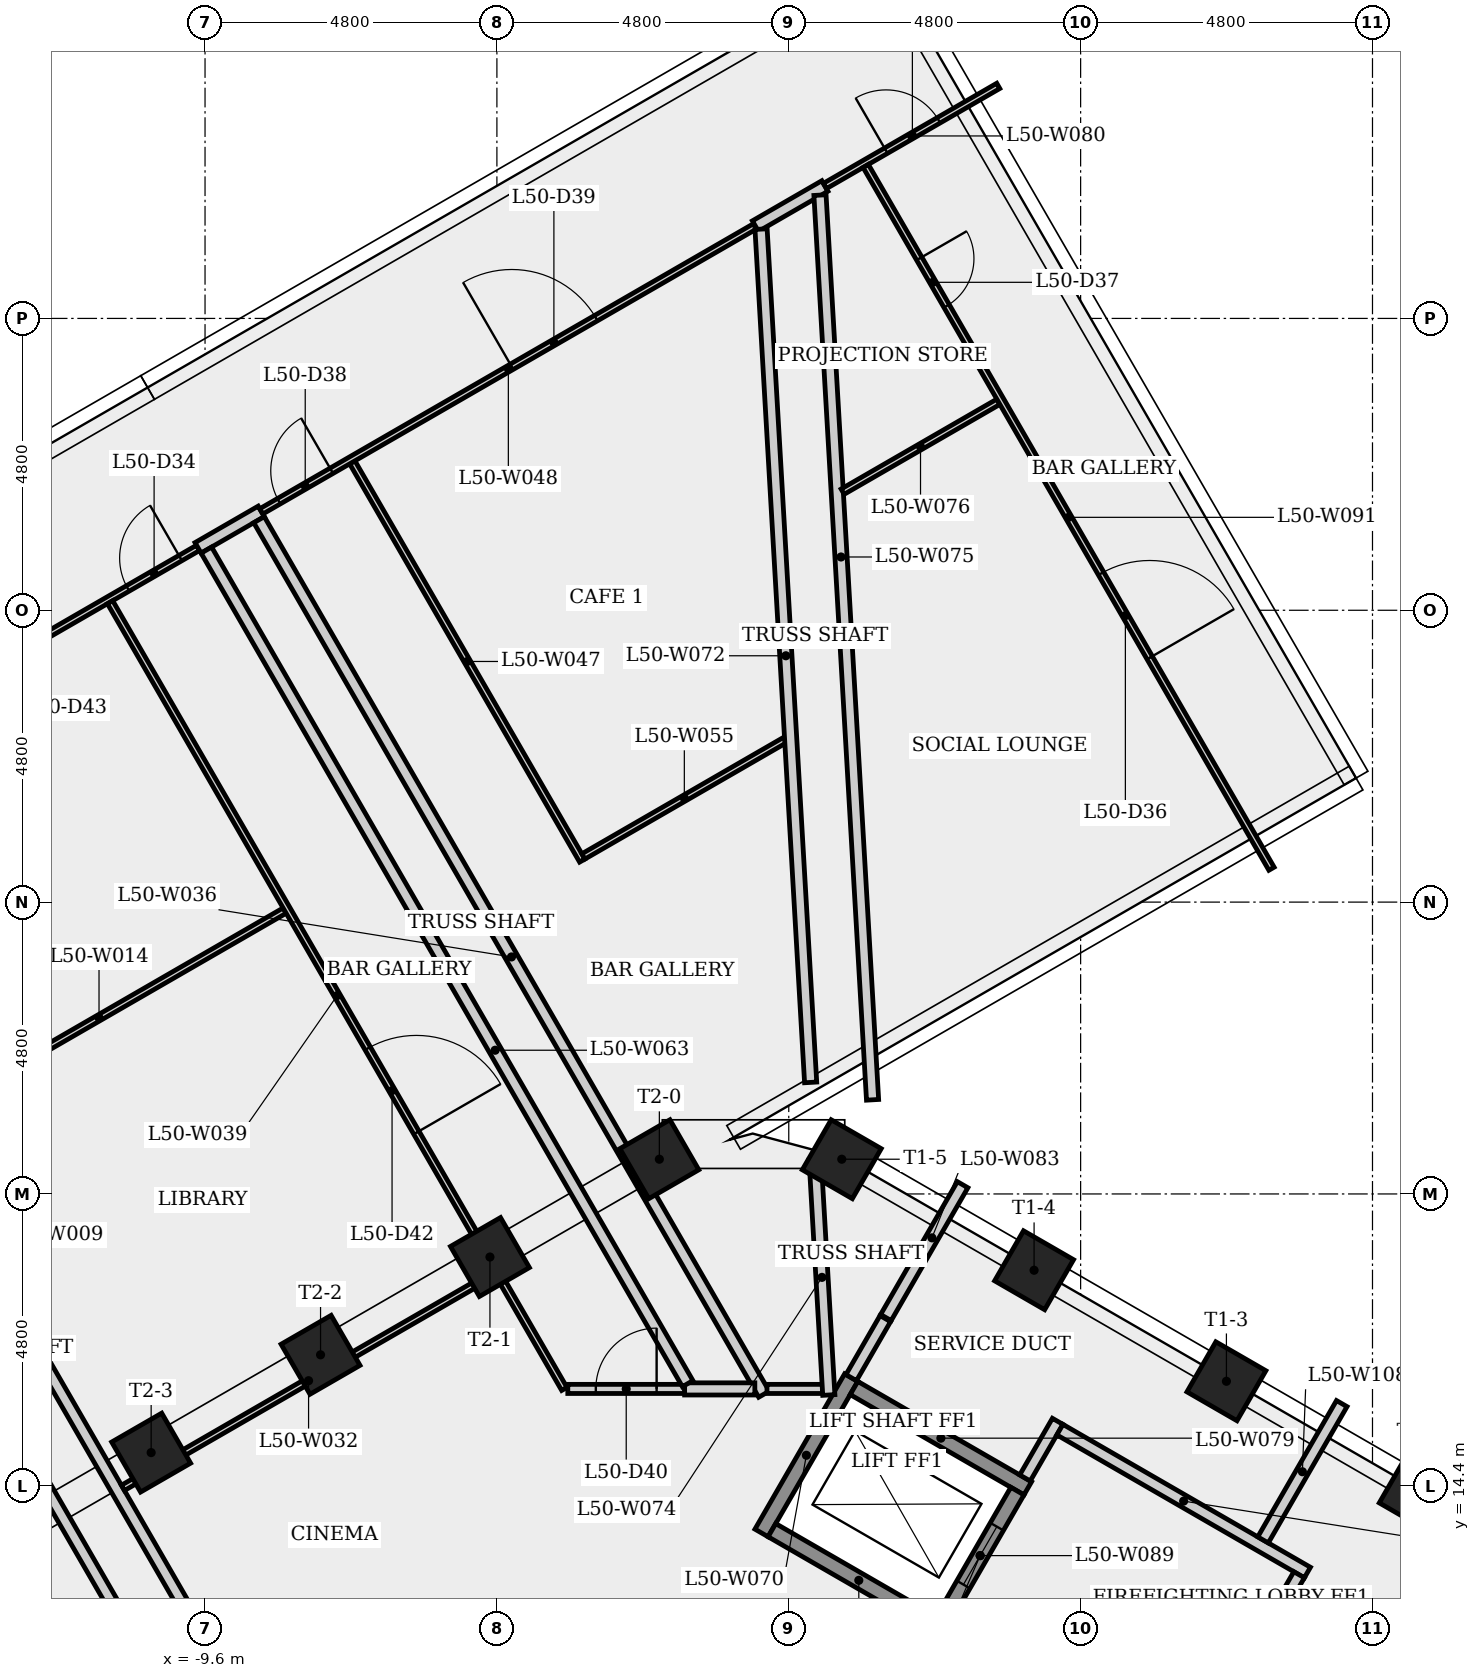
"""IFC4 building model, lengths in metres.
Left out: names, types, materials, properties, quantities, classifications, styles, units other than length and angle.
Written with IfcOpenShell. Run it as: python <this file> out.ifc"""

import sys

from ifc_helpers import new_model, si_unit, direction, frame, frame_2d, origin, origin_2d, place, context, subcontext, project, spatial, rectangle, extrude, element, fill, save


model = new_model("IFC4")
c1 = context("Model", 3, precision=1e-05, world=origin(), true_north=direction((0.0, 1.0)))
c2 = subcontext(c1, "Body", "Model", "MODEL_VIEW")
j1 = project(units=[si_unit("LENGTHUNIT", "METRE"), si_unit("PLANEANGLEUNIT", "RADIAN")], contexts=[c1])
p1 = place(None, origin())
s1 = spatial("IfcSite", under=j1, at=p1, CompositionType="ELEMENT")
p2 = place(p1, origin())
s2 = spatial("IfcBuilding", under=s1, at=p2, CompositionType="ELEMENT")
p3 = place(p2, frame((0.0, 0.0, 186.7)))
s3 = spatial("IfcBuildingStorey", under=s2, at=p3, CompositionType="ELEMENT", Elevation=186.7)
for number, where, z_axis, x_axis in (
    (1, (10.361, 14.293, 0.0), (0.0, 0.0, 1.0), (0.5, 0.866, 0.0)),
    (2, (7.198, 16.119, 0.0), (0.0, 0.0, 1.0), (0.5, 0.866, 0.0)),
    (3, (4.035, 17.945, 0.0), (0.0, 0.0, 1.0), (0.5, 0.866, 0.0)),
    (4, (0.872, 19.771, 0.0), (0.0, 0.0, 1.0), (0.5, 0.866, 0.0)),
    (5, (-2.128, 19.771, 0.0), (0.0, 0.0, 1.0), (-0.5, 0.866, 0.0)),
    (6, (-4.914, 18.163, 0.0), (0.0, 0.0, 1.0), (-0.5, 0.866, 0.0)),
    (7, (-7.7, 16.554, 0.0), (0.0, 0.0, 1.0), (-0.5, 0.866, 0.0)),
    (8, (-10.486, 14.946, 0.0), (0.0, 0.0, 1.0), (-0.5, 0.866, 0.0)),
):
    element("IfcColumn", number, at=place(p3, frame(where, z_axis=z_axis, x_axis=x_axis)), inside=s3, PredefinedType="COLUMN", context=c2, shape_type="SweptSolid", body=[
        extrude(rectangle(XDim=0.95, YDim=0.95, at=origin_2d()), origin(), (0.0, 0.0, 1.0), 4.0),
    ])
p4 = place(p3, frame((-17.372, 25.29, 0.0), z_axis=(0.0, 0.0, 1.0), x_axis=(0.5000029704, -0.866023688816, 0.0)))
e9 = element("IfcWall", 9, at=p4, inside=s3, PredefinedType="PLUMBINGWALL", context=c2, shape_type="SweptSolid", body=[
    extrude(rectangle(XDim=19.538, YDim=0.2, at=frame_2d((9.769, 0.0))), origin(), (0.0, 0.0, 1.0), 3.6),
])
p5 = place(p3, frame((-18.238, 24.79, 0.0), z_axis=(0.0, 0.0, 1.0), x_axis=(0.500002415695, -0.866024009078, 0.0)))
e10 = element("IfcWall", 10, at=p5, inside=s3, PredefinedType="PLUMBINGWALL", context=c2, shape_type="SweptSolid", body=[
    extrude(rectangle(XDim=15.123, YDim=0.2, at=frame_2d((7.561, 0.0))), origin(), (0.0, 0.0, 1.0), 3.6),
])
p6 = place(p3, frame((-14.396, 20.335, 0.0), z_axis=(0.0, 0.0, 1.0), x_axis=(0.866031034943, 0.499990246421, 0.0)))
e11 = element("IfcWall", 11, at=p6, inside=s3, PredefinedType="PARTITIONING", context=c2, shape_type="SweptSolid", body=[
    extrude(rectangle(XDim=7.05, YDim=0.1, at=frame_2d((3.525, 0.0))), origin(), (0.0, 0.0, 1.0), 3.6),
])
p7 = place(p3, frame((-17.336, 25.426, 0.0), z_axis=(0.0, 0.0, 1.0), x_axis=(0.866020190133, 0.500009030201, 0.0)))
e12 = element("IfcWall", 12, at=p7, inside=s3, PredefinedType="PARTITIONING", context=c2, shape_type="SweptSolid", body=[
    extrude(rectangle(XDim=8.8, YDim=0.1, at=frame_2d((4.4, 0.0))), origin(), (0.0, 0.0, 1.0), 3.6),
])
p8 = place(p7, frame((7.465, 0.0, 0.0)))
e13 = element("IfcOpeningElement", 13, at=p8, cuts=e12, PredefinedType="OPENING", context=c2, shape_type="SweptSolid", body=[
    extrude(rectangle(XDim=1.0, YDim=2.1, at=frame_2d((0.5, 1.05))), frame((0.0, 0.06, 0.0), z_axis=(0.0, -1.0, 0.0), x_axis=(1.0, 0.0, 0.0)), (0.0, 0.0, 1.0), 0.12),
])
p9 = place(p7, frame((2.735, 0.0, 0.0)))
e14 = element("IfcOpeningElement", 14, at=p9, cuts=e12, PredefinedType="OPENING", context=c2, shape_type="SweptSolid", body=[
    extrude(rectangle(XDim=1.6, YDim=2.1, at=frame_2d((0.8, 1.05))), frame((0.0, 0.06, 0.0), z_axis=(0.0, -1.0, 0.0), x_axis=(1.0, 0.0, 0.0)), (0.0, 0.0, 1.0), 0.12),
])
p10 = place(p3, frame((-10.95, 14.366, 0.0), z_axis=(0.0, 0.0, 1.0), x_axis=(0.866016039709, 0.500016218704, 0.0)))
e15 = element("IfcWall", 15, at=p10, inside=s3, PredefinedType="PARTITIONING", context=c2, shape_type="SweptSolid", body=[
    extrude(rectangle(XDim=7.05, YDim=0.1, at=frame_2d((3.525, 0.0))), origin(), (0.0, 0.0, 1.0), 3.6),
])
p11 = place(p3, frame((-9.715, 29.826, 0.0), z_axis=(0.0, 0.0, 1.0), x_axis=(0.866094119867, 0.499880961361, 0.0)))
e16 = element("IfcWall", 16, at=p11, inside=s3, PredefinedType="PLUMBINGWALL", context=c2, shape_type="SweptSolid", body=[
    extrude(rectangle(XDim=1.2, YDim=0.2, at=frame_2d((0.6, 0.0))), origin(), (0.0, 0.0, 1.0), 3.6),
])
p12 = place(p3, frame((-8.712, 30.29, 0.0), z_axis=(0.0, 0.0, 1.0), x_axis=(0.500001553912, -0.866024506631, 0.0)))
e17 = element("IfcWall", 17, at=p12, inside=s3, PredefinedType="PLUMBINGWALL", context=c2, shape_type="SweptSolid", body=[
    extrude(rectangle(XDim=16.608, YDim=0.2, at=frame_2d((8.304, 0.0))), origin(), (0.0, 0.0, 1.0), 3.6),
])
p13 = place(p3, frame((-11.162, 28.933, 0.0), z_axis=(0.0, 0.0, 1.0), x_axis=(0.500005339912, -0.866022320763, 0.0)))
e18 = element("IfcWall", 18, at=p13, inside=s3, PredefinedType="PARTITIONING", context=c2, shape_type="SweptSolid", body=[
    extrude(rectangle(XDim=14.941, YDim=0.1, at=frame_2d((7.471, 0.0))), origin(), (0.0, 0.0, 1.0), 3.6),
])
p14 = place(p13, frame((8.475, 0.0, 0.0)))
e19 = element("IfcOpeningElement", 19, at=p14, cuts=e18, PredefinedType="OPENING", context=c2, shape_type="SweptSolid", body=[
    extrude(rectangle(XDim=1.6, YDim=2.1, at=frame_2d((0.8, 1.05))), frame((0.0, 0.06, 0.0), z_axis=(0.0, -1.0, 0.0), x_axis=(1.0, 0.0, 0.0)), (0.0, 0.0, 1.0), 0.12),
])
p15 = place(p3, frame((-7.178, 31.233, 0.0), z_axis=(0.0, 0.0, 1.0), x_axis=(0.500006527538, -0.866021635076, 0.0)))
e20 = element("IfcWall", 20, at=p15, inside=s3, PredefinedType="PARTITIONING", context=c2, shape_type="SweptSolid", body=[
    extrude(rectangle(XDim=7.563, YDim=0.1, at=frame_2d((3.782, 0.0))), origin(), (0.0, 0.0, 1.0), 3.6),
])
p16 = place(p3, frame((-8.676, 30.426, 0.0), z_axis=(0.0, 0.0, 1.0), x_axis=(0.866025296335, 0.500000186108, 0.0)))
e21 = element("IfcWall", 21, at=p16, inside=s3, PredefinedType="PARTITIONING", context=c2, shape_type="SweptSolid", body=[
    extrude(rectangle(XDim=9.385, YDim=0.1, at=frame_2d((4.692, 0.0))), origin(), (0.0, 0.0, 1.0), 3.6),
])
p17 = place(p16, frame((0.335, 0.0, 0.0)))
e22 = element("IfcOpeningElement", 22, at=p17, cuts=e21, PredefinedType="OPENING", context=c2, shape_type="SweptSolid", body=[
    extrude(rectangle(XDim=1.0, YDim=2.1, at=frame_2d((0.5, 1.05))), frame((0.0, 0.06, 0.0), z_axis=(0.0, -1.0, 0.0), x_axis=(1.0, 0.0, 0.0)), (0.0, 0.0, 1.0), 0.12),
])
p18 = place(p16, frame((4.757, 0.0, 0.0)))
e23 = element("IfcOpeningElement", 23, at=p18, cuts=e21, PredefinedType="OPENING", context=c2, shape_type="SweptSolid", body=[
    extrude(rectangle(XDim=1.6, YDim=2.1, at=frame_2d((0.8, 1.05))), frame((0.0, 0.06, 0.0), z_axis=(0.0, -1.0, 0.0), x_axis=(1.0, 0.0, 0.0)), (0.0, 0.0, 1.0), 0.12),
])
p19 = place(p3, frame((-3.634, 15.993, 0.0), z_axis=(0.0, 0.0, 1.0), x_axis=(1.0, 0.0, 0.0)))
e24 = element("IfcWall", 24, at=p19, inside=s3, PredefinedType="PARTITIONING", context=c2, shape_type="SweptSolid", body=[
    extrude(rectangle(XDim=1.921, YDim=0.15, at=frame_2d((0.96, 0.0))), origin(), (0.0, 0.0, 1.0), 3.6),
])
p20 = place(p19, frame((0.461, 0.0, 0.0)))
e25 = element("IfcOpeningElement", 25, at=p20, cuts=e24, PredefinedType="OPENING", context=c2, shape_type="SweptSolid", body=[
    extrude(rectangle(XDim=1.0, YDim=2.1, at=frame_2d((0.5, 1.05))), frame((0.0, 0.085, 0.0), z_axis=(0.0, -1.0, 0.0), x_axis=(1.0, 0.0, 0.0)), (0.0, 0.0, 1.0), 0.17),
])
p21 = place(p3, frame((-3.378, 24.751, 0.0), z_axis=(0.0, 0.0, 1.0), x_axis=(0.866060495566, 0.499939214325, 0.0)))
e26 = element("IfcWall", 26, at=p21, inside=s3, PredefinedType="PARTITIONING", context=c2, shape_type="SweptSolid", body=[
    extrude(rectangle(XDim=3.835, YDim=0.1, at=frame_2d((1.917, 0.0))), origin(), (0.0, 0.0, 1.0), 3.6),
])
p22 = place(p3, frame((-1.713, 15.993, 0.0), z_axis=(0.0, 0.0, 1.0), x_axis=(1.0, 0.0, 0.0)))
e27 = element("IfcWall", 27, at=p22, inside=s3, PredefinedType="PLUMBINGWALL", context=c2, shape_type="SweptSolid", body=[
    extrude(rectangle(XDim=1.155, YDim=0.2, at=frame_2d((0.578, 0.0))), origin(), (0.0, 0.0, 1.0), 3.6),
])
p23 = place(p3, frame((-1.663, 16.08, 0.0), z_axis=(0.0, 0.0, 1.0), x_axis=(-0.499998792841, 0.866026100737, 0.0)))
e28 = element("IfcWall", 28, at=p23, inside=s3, PredefinedType="PLUMBINGWALL", context=c2, shape_type="SweptSolid", body=[
    extrude(rectangle(XDim=15.831, YDim=0.2, at=frame_2d((7.915, 0.0))), origin(), (0.0, 0.0, 1.0), 3.6),
])
p24 = place(p3, frame((-0.548, 35.118, 0.0), z_axis=(0.0, 0.0, 1.0), x_axis=(0.865979071295, 0.500080241641, 0.0)))
e29 = element("IfcWall", 29, at=p24, inside=s3, PredefinedType="PLUMBINGWALL", context=c2, shape_type="SweptSolid", body=[
    extrude(rectangle(XDim=1.319, YDim=0.2, at=frame_2d((0.66, 0.0))), origin(), (0.0, 0.0, 1.0), 3.6),
])
p25 = place(p3, frame((-0.358, 15.993, 0.0), z_axis=(0.0, 0.0, 1.0), x_axis=(1.0, 0.0, 0.0)))
e30 = element("IfcWall", 30, at=p25, inside=s3, PredefinedType="PARTITIONING", context=c2, shape_type="SweptSolid", body=[
    extrude(rectangle(XDim=0.911, YDim=0.15, at=frame_2d((0.456, 0.0))), origin(), (0.0, 0.0, 1.0), 3.6),
])
p26 = place(p3, frame((-0.448, 13.624, 0.0), z_axis=(0.0, 0.0, 1.0), x_axis=(0.500037662692, 0.866003658127, 0.0)))
e31 = element("IfcWall", 31, at=p26, inside=s3, PredefinedType="SHEAR", context=c2, shape_type="SweptSolid", body=[
    extrude(rectangle(XDim=2.95, YDim=0.25, at=frame_2d((1.475, 0.0))), origin(), (0.0, 0.0, 1.0), 3.6),
])
p27 = place(p3, frame((-0.456, 35.069, 0.0), z_axis=(0.0, 0.0, 1.0), x_axis=(0.058023609074, -0.998315211138, 0.0)))
e32 = element("IfcWall", 32, at=p27, inside=s3, PredefinedType="PLUMBINGWALL", context=c2, shape_type="SweptSolid", body=[
    extrude(rectangle(XDim=14.058, YDim=0.2, at=frame_2d((7.029, 0.0))), origin(), (0.0, 0.0, 1.0), 3.6),
])
p28 = place(p3, frame((0.434, 19.763, 0.0), z_axis=(0.0, 0.0, 1.0), x_axis=(0.058013052841, -0.998315824627, 0.0)))
e33 = element("IfcWall", 33, at=p28, inside=s3, PredefinedType="PLUMBINGWALL", context=c2, shape_type="SweptSolid", body=[
    extrude(rectangle(XDim=3.876, YDim=0.2, at=frame_2d((1.938, 0.0))), origin(), (0.0, 0.0, 1.0), 3.6),
])
p29 = place(p3, frame((0.513, 35.628, 0.0), z_axis=(0.0, 0.0, 1.0), x_axis=(0.058016275697, -0.998315637338, 0.0)))
e34 = element("IfcWall", 34, at=p29, inside=s3, PredefinedType="PLUMBINGWALL", context=c2, shape_type="SweptSolid", body=[
    extrude(rectangle(XDim=14.905, YDim=0.2, at=frame_2d((7.453, 0.0))), origin(), (0.0, 0.0, 1.0), 3.6),
])
p30 = place(p3, frame((0.886, 30.751, 0.0), z_axis=(0.0, 0.0, 1.0), x_axis=(0.866019217765, 0.500010714347, 0.0)))
e35 = element("IfcWall", 35, at=p30, inside=s3, PredefinedType="PARTITIONING", context=c2, shape_type="SweptSolid", body=[
    extrude(rectangle(XDim=2.957, YDim=0.1, at=frame_2d((1.479, 0.0))), origin(), (0.0, 0.0, 1.0), 3.6),
])
p31 = place(p3, frame((1.027, 16.179, 0.0), z_axis=(0.0, 0.0, 1.0), x_axis=(0.499911014785, 0.866076773327, 0.0)))
e36 = element("IfcWall", 36, at=p31, inside=s3, PredefinedType="PLUMBINGWALL", context=c2, shape_type="SweptSolid", body=[
    extrude(rectangle(XDim=1.121, YDim=0.2, at=frame_2d((0.561, 0.0))), origin(), (0.0, 0.0, 1.0), 3.6),
])
p32 = place(p3, frame((1.073, 16.008, 0.0), z_axis=(0.0, 0.0, 1.0), x_axis=(0.866040211805, -0.499974350878, 0.0)))
e37 = element("IfcWall", 37, at=p32, inside=s3, PredefinedType="SHEAR", context=c2, shape_type="SweptSolid", body=[
    extrude(rectangle(XDim=3.3, YDim=0.25, at=frame_2d((1.65, 0.0))), origin(), (0.0, 0.0, 1.0), 3.6),
])
p33 = place(p3, frame((0.594, 35.778, 0.0), z_axis=(0.0, 0.0, 1.0), x_axis=(0.866039888171, 0.499974911467, 0.0)))
e38 = element("IfcWall", 38, at=p33, inside=s3, PredefinedType="PARTITIONING", context=c2, shape_type="SweptSolid", body=[
    extrude(rectangle(XDim=3.293, YDim=0.1, at=frame_2d((1.646, 0.0))), origin(), (0.0, 0.0, 1.0), 3.6),
])
p34 = place(p33, frame((1.161, 0.0, 0.0)))
e39 = element("IfcOpeningElement", 39, at=p34, cuts=e38, PredefinedType="OPENING", context=c2, shape_type="SweptSolid", body=[
    extrude(rectangle(XDim=1.0, YDim=2.1, at=frame_2d((0.5, 1.05))), frame((0.0, 0.06, 0.0), z_axis=(0.0, -1.0, 0.0), x_axis=(1.0, 0.0, 0.0)), (0.0, 0.0, 1.0), 0.12),
])
p35 = place(p3, frame((1.597, 17.167, 0.0), z_axis=(0.0, 0.0, 1.0), x_axis=(0.50000999488, 0.866019633161, 0.0)))
e40 = element("IfcWall", 40, at=p35, inside=s3, PredefinedType="PLUMBINGWALL", context=c2, shape_type="SweptSolid", body=[
    extrude(rectangle(XDim=2.523, YDim=0.2, at=frame_2d((1.262, 0.0))), origin(), (0.0, 0.0, 1.0), 3.6),
])
p36 = place(p3, frame((2.581, 12.02, 0.0), z_axis=(0.0, 0.0, 1.0), x_axis=(-0.866040211805, 0.499974350878, 0.0)))
e41 = element("IfcWall", 41, at=p36, inside=s3, PredefinedType="SHEAR", context=c2, shape_type="SweptSolid", body=[
    extrude(rectangle(XDim=3.3, YDim=0.25, at=frame_2d((1.65, 0.0))), origin(), (0.0, 0.0, 1.0), 3.6),
])
p37 = place(p3, frame((2.535, 12.191, 0.0), z_axis=(0.0, 0.0, 1.0), x_axis=(0.500061746146, 0.865989751695, 0.0)))
e42 = element("IfcWall", 42, at=p37, inside=s3, PredefinedType="SHEAR", context=c2, shape_type="SweptSolid", body=[
    extrude(rectangle(XDim=2.45, YDim=0.25, at=frame_2d((1.225, 0.0))), origin(), (0.0, 0.0, 1.0), 4.0),
])
p38 = place(p37, frame((0.675, 0.0, 0.0)))
e43 = element("IfcOpeningElement", 43, at=p38, cuts=e42, PredefinedType="OPENING", context=c2, shape_type="SweptSolid", body=[
    extrude(rectangle(XDim=1.1, YDim=2.1, at=frame_2d((0.55, 1.05))), frame((0.0, 0.135, 0.0), z_axis=(0.0, -1.0, 0.0), x_axis=(1.0, 0.0, 0.0)), (0.0, 0.0, 1.0), 0.27),
])
p39 = place(p3, frame((1.266, 36.108, 0.0), z_axis=(0.0, 0.0, 1.0), x_axis=(0.500004822225, -0.866022619654, 0.0)))
e44 = element("IfcWall", 44, at=p39, inside=s3, PredefinedType="PARTITIONING", context=c2, shape_type="SweptSolid", body=[
    extrude(rectangle(XDim=13.347, YDim=0.1, at=frame_2d((6.673, 0.0))), origin(), (0.0, 0.0, 1.0), 3.6),
])
p40 = place(p39, frame((7.74, 0.0, 0.0)))
e45 = element("IfcOpeningElement", 45, at=p40, cuts=e44, PredefinedType="OPENING", context=c2, shape_type="SweptSolid", body=[
    extrude(rectangle(XDim=1.6, YDim=2.1, at=frame_2d((0.8, 1.05))), frame((0.0, 0.06, 0.0), z_axis=(0.0, -1.0, 0.0), x_axis=(1.0, 0.0, 0.0)), (0.0, 0.0, 1.0), 0.12),
])
p41 = place(p39, frame((1.76, 0.0, 0.0)))
e46 = element("IfcOpeningElement", 46, at=p41, cuts=e44, PredefinedType="OPENING", context=c2, shape_type="SweptSolid", body=[
    extrude(rectangle(XDim=0.9, YDim=2.1, at=frame_2d((0.45, 1.05))), frame((0.0, 0.06, 0.0), z_axis=(0.0, -1.0, 0.0), x_axis=(1.0, 0.0, 0.0)), (0.0, 0.0, 1.0), 0.12),
])
p42 = place(p3, frame((3.885, 14.529, 0.0), z_axis=(0.0, 0.0, 1.0), x_axis=(0.499997628298, 0.866026773083, 0.0)))
e47 = element("IfcWall", 47, at=p42, inside=s3, PredefinedType="PLUMBINGWALL", context=c2, shape_type="SweptSolid", body=[
    extrude(rectangle(XDim=1.075, YDim=0.2, at=frame_2d((0.538, 0.0))), origin(), (0.0, 0.0, 1.0), 3.6),
])
p43 = place(p3, frame((4.459, 15.323, 0.0), z_axis=(0.0, 0.0, 1.0), x_axis=(0.866016039709, -0.500016218704, 0.0)))
e48 = element("IfcWall", 48, at=p43, inside=s3, PredefinedType="PLUMBINGWALL", context=c2, shape_type="SweptSolid", body=[
    extrude(rectangle(XDim=4.7, YDim=0.2, at=frame_2d((2.35, 0.0))), origin(), (0.0, 0.0, 1.0), 3.6),
])
p44 = place(p3, frame((7.8, 13.51, 0.0), z_axis=(0.0, 0.0, 1.0), x_axis=(0.499972779981, 0.866041118699, 0.0)))
e49 = element("IfcWall", 49, at=p44, inside=s3, PredefinedType="PLUMBINGWALL", context=c2, shape_type="SweptSolid", body=[
    extrude(rectangle(XDim=2.589, YDim=0.2, at=frame_2d((1.294, 0.0))), origin(), (0.0, 0.0, 1.0), 3.6),
])
p45 = place(p3, frame((8.393, 12.937, 0.0), z_axis=(0.0, 0.0, 1.0), x_axis=(-0.500065409566, -0.86598763626, 0.0)))
e50 = element("IfcWall", 50, at=p45, inside=s3, PredefinedType="PLUMBINGWALL", context=c2, shape_type="SweptSolid", body=[
    extrude(rectangle(XDim=0.575, YDim=0.2, at=frame_2d((0.288, 0.0))), origin(), (0.0, 0.0, 1.0), 3.6),
])
p46 = place(p38, origin())
e51 = element("IfcDoor", 51, at=p46, inside=s3, OperationType="SLIDING_TO_LEFT", PredefinedType="DOOR", context=c2, shape_type="SweptSolid", body=[
    extrude(rectangle(XDim=1.1, YDim=2.1, at=frame_2d((0.55, 1.05))), frame((0.0, 0.025, 0.0), z_axis=(0.0, -1.0, 0.0), x_axis=(1.0, 0.0, 0.0)), (0.0, 0.0, 1.0), 0.05),
])
fill(e43, e51)
p47 = place(p8, origin())
e52 = element("IfcDoor", 52, at=p47, inside=s3, OperationType="SINGLE_SWING_RIGHT", PredefinedType="DOOR", context=c2, shape_type="SweptSolid", body=[
    extrude(rectangle(XDim=1.0, YDim=2.1, at=frame_2d((0.5, 1.05))), frame((0.0, 0.025, 0.0), z_axis=(0.0, -1.0, 0.0), x_axis=(1.0, 0.0, 0.0)), (0.0, 0.0, 1.0), 0.05),
])
fill(e13, e52)
p48 = place(p34, origin())
e53 = element("IfcDoor", 53, at=p48, inside=s3, OperationType="SINGLE_SWING_LEFT", PredefinedType="DOOR", context=c2, shape_type="SweptSolid", body=[
    extrude(rectangle(XDim=1.0, YDim=2.1, at=frame_2d((0.5, 1.05))), frame((0.0, 0.025, 0.0), z_axis=(0.0, -1.0, 0.0), x_axis=(1.0, 0.0, 0.0)), (0.0, 0.0, 1.0), 0.05),
])
fill(e39, e53)
p49 = place(p40, origin())
e54 = element("IfcDoor", 54, at=p49, inside=s3, OperationType="SINGLE_SWING_RIGHT", PredefinedType="DOOR", context=c2, shape_type="SweptSolid", body=[
    extrude(rectangle(XDim=1.6, YDim=2.1, at=frame_2d((0.8, 1.05))), frame((0.0, 0.025, 0.0), z_axis=(0.0, -1.0, 0.0), x_axis=(1.0, 0.0, 0.0)), (0.0, 0.0, 1.0), 0.05),
])
fill(e45, e54)
p50 = place(p41, origin())
e55 = element("IfcDoor", 55, at=p50, inside=s3, OperationType="SINGLE_SWING_LEFT", PredefinedType="DOOR", context=c2, shape_type="SweptSolid", body=[
    extrude(rectangle(XDim=0.9, YDim=2.1, at=frame_2d((0.45, 1.05))), frame((0.0, 0.025, 0.0), z_axis=(0.0, -1.0, 0.0), x_axis=(1.0, 0.0, 0.0)), (0.0, 0.0, 1.0), 0.05),
])
fill(e46, e55)
p51 = place(p17, origin())
e56 = element("IfcDoor", 56, at=p51, inside=s3, OperationType="SINGLE_SWING_RIGHT", PredefinedType="DOOR", context=c2, shape_type="SweptSolid", body=[
    extrude(rectangle(XDim=1.0, YDim=2.1, at=frame_2d((0.5, 1.05))), frame((0.0, 0.025, 0.0), z_axis=(0.0, -1.0, 0.0), x_axis=(1.0, 0.0, 0.0)), (0.0, 0.0, 1.0), 0.05),
])
fill(e22, e56)
p52 = place(p18, origin())
e57 = element("IfcDoor", 57, at=p52, inside=s3, OperationType="SINGLE_SWING_LEFT", PredefinedType="DOOR", context=c2, shape_type="SweptSolid", body=[
    extrude(rectangle(XDim=1.6, YDim=2.1, at=frame_2d((0.8, 1.05))), frame((0.0, 0.025, 0.0), z_axis=(0.0, -1.0, 0.0), x_axis=(1.0, 0.0, 0.0)), (0.0, 0.0, 1.0), 0.05),
])
fill(e23, e57)
p53 = place(p20, origin())
e58 = element("IfcDoor", 58, at=p53, inside=s3, OperationType="SINGLE_SWING_RIGHT", PredefinedType="DOOR", context=c2, shape_type="SweptSolid", body=[
    extrude(rectangle(XDim=1.0, YDim=2.1, at=frame_2d((0.5, 1.05))), frame((0.0, 0.025, 0.0), z_axis=(0.0, -1.0, 0.0), x_axis=(1.0, 0.0, 0.0)), (0.0, 0.0, 1.0), 0.05),
])
fill(e25, e58)
p54 = place(p14, origin())
e59 = element("IfcDoor", 59, at=p54, inside=s3, OperationType="SINGLE_SWING_RIGHT", PredefinedType="DOOR", context=c2, shape_type="SweptSolid", body=[
    extrude(rectangle(XDim=1.6, YDim=2.1, at=frame_2d((0.8, 1.05))), frame((0.0, 0.025, 0.0), z_axis=(0.0, -1.0, 0.0), x_axis=(1.0, 0.0, 0.0)), (0.0, 0.0, 1.0), 0.05),
])
fill(e19, e59)
save(model, sys.argv[1])
